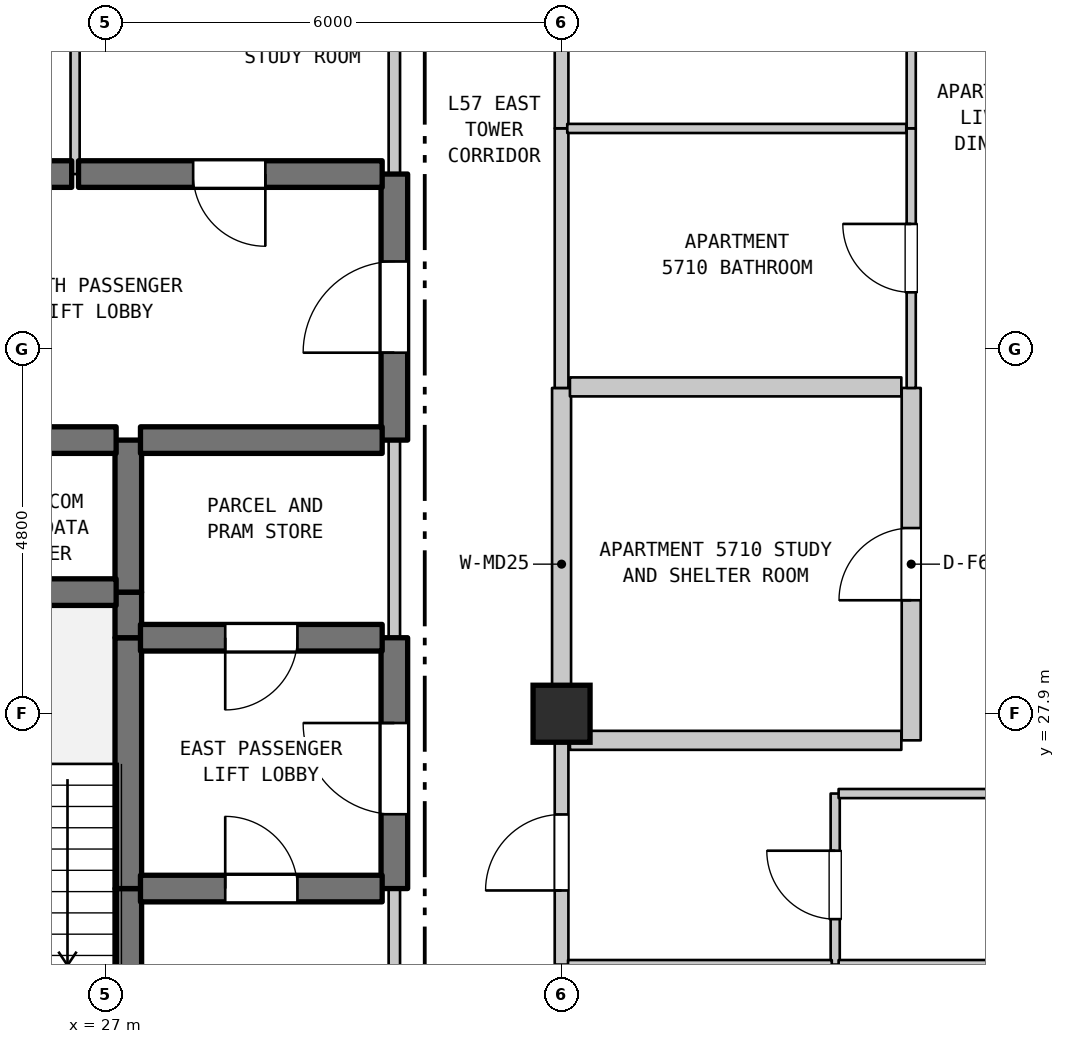
"""IFC4 building model, lengths in metres.
Left out: names, types, materials, properties, quantities, classifications, styles, units other than length and angle.
Written with IfcOpenShell. Run it as: python <this file> out.ifc"""

import sys

from ifc_helpers import new_model, si_unit, direction, frame, frame_2d, origin, origin_2d, place, context, subcontext, project, spatial, rectangle, extrude, element, fill, save


model = new_model("IFC4")
c1 = context("Model", 3, precision=1e-05, world=origin(), true_north=direction((0.0, 1.0)))
c2 = subcontext(c1, "Body", "Model", "MODEL_VIEW")
j1 = project(units=[si_unit("LENGTHUNIT", "METRE"), si_unit("PLANEANGLEUNIT", "RADIAN")], contexts=[c1])
p1 = place(None, origin())
s1 = spatial("IfcSite", under=j1, at=p1, CompositionType="ELEMENT")
p2 = place(p1, origin())
s2 = spatial("IfcBuilding", under=s1, at=p2, CompositionType="ELEMENT")
p3 = place(p2, frame((0.0, 0.0, 230.2)))
s3 = spatial("IfcBuildingStorey", under=s2, at=p3, CompositionType="ELEMENT", Elevation=230.2)
p4 = place(p3, frame((33.0, 27.9, 0.0), z_axis=(0.0, 0.0, 1.0), x_axis=(1.0, 0.0, 0.0)))
e1 = element("IfcColumn", 1, at=p4, inside=s3, PredefinedType="COLUMN", context=c2, shape_type="SweptSolid", body=[
    extrude(rectangle(XDim=0.75, YDim=0.75, at=origin_2d()), origin(), (0.0, 0.0, 1.0), 3.7),
])
p5 = place(p3, frame((26.6, 35.0, 0.0), z_axis=(0.0, 0.0, 1.0), x_axis=(0.0, 1.0, 0.0)))
e2 = element("IfcWall", 2, at=p5, inside=s3, PredefinedType="PARTITIONING", context=c2, shape_type="SweptSolid", body=[
    extrude(rectangle(XDim=2.9, YDim=0.12, at=frame_2d((1.45, 0.0))), origin(), (0.0, 0.0, 1.0), 3.39),
])
p6 = place(p3, frame((27.3, 22.7, 0.0), z_axis=(0.0, 0.0, 1.0), x_axis=(0.0, 1.0, 0.0)))
e3 = element("IfcWall", 3, at=p6, inside=s3, PredefinedType="SHEAR", context=c2, shape_type="SweptSolid", body=[
    extrude(rectangle(XDim=2.9, YDim=0.35, at=frame_2d((1.45, 0.0))), origin(), (0.0, 0.0, 1.0), 3.39),
])
p7 = place(p3, frame((27.3, 25.6, 0.0), z_axis=(0.0, 0.0, 1.0), x_axis=(0.0, 1.0, 0.0)))
e4 = element("IfcWall", 4, at=p7, inside=s3, PredefinedType="SHEAR", context=c2, shape_type="SweptSolid", body=[
    extrude(rectangle(XDim=3.3, YDim=0.35, at=frame_2d((1.65, 0.0))), origin(), (0.0, 0.0, 1.0), 3.39),
])
p8 = place(p3, frame((27.3, 28.9, 0.0), z_axis=(0.0, 0.0, 1.0), x_axis=(0.0, 1.0, 0.0)))
e5 = element("IfcWall", 5, at=p8, inside=s3, PredefinedType="SHEAR", context=c2, shape_type="SweptSolid", body=[
    extrude(rectangle(XDim=0.6, YDim=0.35, at=frame_2d((0.3, 0.0))), origin(), (0.0, 0.0, 1.0), 3.39),
])
p9 = place(p3, frame((27.3, 29.5, 0.0), z_axis=(0.0, 0.0, 1.0), x_axis=(0.0, 1.0, 0.0)))
e6 = element("IfcWall", 6, at=p9, inside=s3, PredefinedType="SHEAR", context=c2, shape_type="SweptSolid", body=[
    extrude(rectangle(XDim=2.0, YDim=0.35, at=frame_2d((1.0, 0.0))), origin(), (0.0, 0.0, 1.0), 3.39),
])
p10 = place(p3, frame((30.8, 22.7, 0.0), z_axis=(0.0, 0.0, 1.0), x_axis=(0.0, 1.0, 0.0)))
e7 = element("IfcWall", 7, at=p10, inside=s3, PredefinedType="STANDARD", context=c2, shape_type="SweptSolid", body=[
    extrude(rectangle(XDim=2.9, YDim=0.15, at=frame_2d((1.45, 0.0))), origin(), (0.0, 0.0, 1.0), 3.39),
])
p11 = place(p3, frame((30.8, 25.6, 0.0), z_axis=(0.0, 0.0, 1.0), x_axis=(0.0, 1.0, 0.0)))
e8 = element("IfcWall", 8, at=p11, inside=s3, PredefinedType="SHEAR", context=c2, shape_type="SweptSolid", body=[
    extrude(rectangle(XDim=3.3, YDim=0.35, at=frame_2d((1.65, 0.0))), origin(), (0.0, 0.0, 1.0), 3.39),
])
p12 = place(p11, frame((0.978, 0.0, 0.0)))
e9 = element("IfcOpeningElement", 9, at=p12, cuts=e8, PredefinedType="OPENING", context=c2, shape_type="SweptSolid", body=[
    extrude(rectangle(XDim=1.2, YDim=2.2, at=frame_2d((0.6, 1.1))), frame((0.0, 0.185, 0.0), z_axis=(0.0, -1.0, 0.0), x_axis=(1.0, 0.0, 0.0)), (0.0, 0.0, 1.0), 0.37),
])
p13 = place(p3, frame((30.8, 28.9, 0.0), z_axis=(0.0, 0.0, 1.0), x_axis=(0.0, 1.0, 0.0)))
e10 = element("IfcWall", 10, at=p13, inside=s3, PredefinedType="STANDARD", context=c2, shape_type="SweptSolid", body=[
    extrude(rectangle(XDim=2.6, YDim=0.15, at=frame_2d((1.3, 0.0))), origin(), (0.0, 0.0, 1.0), 3.39),
])
p14 = place(p3, frame((30.8, 31.5, 0.0), z_axis=(0.0, 0.0, 1.0), x_axis=(0.0, 1.0, 0.0)))
e11 = element("IfcWall", 11, at=p14, inside=s3, PredefinedType="SHEAR", context=c2, shape_type="SweptSolid", body=[
    extrude(rectangle(XDim=3.5, YDim=0.35, at=frame_2d((1.75, 0.0))), origin(), (0.0, 0.0, 1.0), 3.39),
])
p15 = place(p14, frame((1.15, 0.0, 0.0)))
e12 = element("IfcOpeningElement", 12, at=p15, cuts=e11, PredefinedType="OPENING", context=c2, shape_type="SweptSolid", body=[
    extrude(rectangle(XDim=1.2, YDim=2.2, at=frame_2d((0.6, 1.1))), frame((0.0, 0.185, 0.0), z_axis=(0.0, -1.0, 0.0), x_axis=(1.0, 0.0, 0.0)), (0.0, 0.0, 1.0), 0.37),
])
p16 = place(p3, frame((30.8, 35.0, 0.0), z_axis=(0.0, 0.0, 1.0), x_axis=(0.0, 1.0, 0.0)))
e13 = element("IfcWall", 13, at=p16, inside=s3, PredefinedType="STANDARD", context=c2, shape_type="SweptSolid", body=[
    extrude(rectangle(XDim=2.9, YDim=0.15, at=frame_2d((1.45, 0.0))), origin(), (0.0, 0.0, 1.0), 3.39),
])
p17 = place(p3, frame((33.0, 24.6, 0.0), z_axis=(0.0, 0.0, 1.0), x_axis=(0.0, 1.0, 0.0)))
e14 = element("IfcWall", 14, at=p17, inside=s3, PredefinedType="STANDARD", context=c2, shape_type="SweptSolid", body=[
    extrude(rectangle(XDim=2.95, YDim=0.18, at=frame_2d((1.475, 0.0))), origin(), (0.0, 0.0, 1.0), 2.99),
])
p18 = place(p17, frame((0.975, 0.0, 0.0)))
e15 = element("IfcOpeningElement", 15, at=p18, cuts=e14, PredefinedType="OPENING", context=c2, shape_type="SweptSolid", body=[
    extrude(rectangle(XDim=1.0, YDim=2.15, at=frame_2d((0.5, 1.075))), frame((0.0, 0.1, 0.0), z_axis=(0.0, -1.0, 0.0), x_axis=(1.0, 0.0, 0.0)), (0.0, 0.0, 1.0), 0.2),
])
p19 = place(p3, frame((33.0, 27.55, 0.0), z_axis=(0.0, 0.0, 1.0), x_axis=(0.0, 1.0, 0.0)))
e16 = element("IfcWall", 16, at=p19, inside=s3, PredefinedType="STANDARD", context=c2, shape_type="SweptSolid", body=[
    extrude(rectangle(XDim=4.636, YDim=0.25, at=frame_2d((2.318, 0.0))), origin(), (0.0, 0.0, 1.0), 2.89),
])
p20 = place(p3, frame((33.0, 32.186, 0.0), z_axis=(0.0, 0.0, 1.0), x_axis=(0.0, 1.0, 0.0)))
e17 = element("IfcWall", 17, at=p20, inside=s3, PredefinedType="STANDARD", context=c2, shape_type="SweptSolid", body=[
    extrude(rectangle(XDim=3.416, YDim=0.18, at=frame_2d((1.708, 0.0))), origin(), (0.0, 0.0, 1.0), 2.89),
])
p21 = place(p3, frame((33.0, 35.602, 0.0), z_axis=(0.0, 0.0, 1.0), x_axis=(0.0, 1.0, 0.0)))
e18 = element("IfcWall", 18, at=p21, inside=s3, PredefinedType="STANDARD", context=c2, shape_type="SweptSolid", body=[
    extrude(rectangle(XDim=2.298, YDim=0.18, at=frame_2d((1.149, 0.0))), origin(), (0.0, 0.0, 1.0), 2.89),
])
p22 = place(p3, frame((36.6, 24.6, 0.0), z_axis=(0.0, 0.0, 1.0), x_axis=(0.0, 1.0, 0.0)))
e19 = element("IfcWall", 19, at=p22, inside=s3, PredefinedType="PARTITIONING", context=c2, shape_type="SweptSolid", body=[
    extrude(rectangle(XDim=2.25, YDim=0.12, at=frame_2d((1.125, 0.0))), origin(), (0.0, 0.0, 1.0), 3.39),
])
p23 = place(p22, frame((0.598, 0.0, 0.0)))
e20 = element("IfcOpeningElement", 20, at=p23, cuts=e19, PredefinedType="OPENING", context=c2, shape_type="SweptSolid", body=[
    extrude(rectangle(XDim=0.9, YDim=2.15, at=frame_2d((0.45, 1.075))), frame((0.0, 0.07, 0.0), z_axis=(0.0, -1.0, 0.0), x_axis=(1.0, 0.0, 0.0)), (0.0, 0.0, 1.0), 0.14),
])
p24 = place(p3, frame((37.6, 27.55, 0.0), z_axis=(0.0, 0.0, 1.0), x_axis=(0.0, 1.0, 0.0)))
e21 = element("IfcWall", 21, at=p24, inside=s3, PredefinedType="STANDARD", context=c2, shape_type="SweptSolid", body=[
    extrude(rectangle(XDim=4.636, YDim=0.25, at=frame_2d((2.318, 0.0))), origin(), (0.0, 0.0, 1.0), 3.39),
])
p25 = place(p24, frame((1.843, 0.0, 0.0)))
e22 = element("IfcOpeningElement", 22, at=p25, cuts=e21, PredefinedType="OPENING", context=c2, shape_type="SweptSolid", body=[
    extrude(rectangle(XDim=0.95, YDim=2.15, at=frame_2d((0.475, 1.075))), frame((0.0, 0.135, 0.0), z_axis=(0.0, -1.0, 0.0), x_axis=(1.0, 0.0, 0.0)), (0.0, 0.0, 1.0), 0.27),
])
p26 = place(p3, frame((37.6, 32.186, 0.0), z_axis=(0.0, 0.0, 1.0), x_axis=(0.0, 1.0, 0.0)))
e23 = element("IfcWall", 23, at=p26, inside=s3, PredefinedType="PARTITIONING", context=c2, shape_type="SweptSolid", body=[
    extrude(rectangle(XDim=3.416, YDim=0.12, at=frame_2d((1.708, 0.0))), origin(), (0.0, 0.0, 1.0), 3.39),
])
p27 = place(p26, frame((1.258, 0.0, 0.0)))
e24 = element("IfcOpeningElement", 24, at=p27, cuts=e23, PredefinedType="OPENING", context=c2, shape_type="SweptSolid", body=[
    extrude(rectangle(XDim=0.9, YDim=2.1, at=frame_2d((0.45, 1.05))), frame((0.0, 0.07, 0.0), z_axis=(0.0, -1.0, 0.0), x_axis=(1.0, 0.0, 0.0)), (0.0, 0.0, 1.0), 0.14),
])
p28 = place(p3, frame((37.6, 35.602, 0.0), z_axis=(0.0, 0.0, 1.0), x_axis=(0.0, 1.0, 0.0)))
e25 = element("IfcWall", 25, at=p28, inside=s3, PredefinedType="PARTITIONING", context=c2, shape_type="SweptSolid", body=[
    extrude(rectangle(XDim=4.148, YDim=0.12, at=frame_2d((2.074, 0.0))), origin(), (0.0, 0.0, 1.0), 3.39),
])
p29 = place(p28, frame((1.552, 0.0, 0.0)))
e26 = element("IfcOpeningElement", 26, at=p29, cuts=e25, PredefinedType="OPENING", context=c2, shape_type="SweptSolid", body=[
    extrude(rectangle(XDim=0.9, YDim=2.15, at=frame_2d((0.45, 1.075))), frame((0.0, 0.07, 0.0), z_axis=(0.0, -1.0, 0.0), x_axis=(1.0, 0.0, 0.0)), (0.0, 0.0, 1.0), 0.14),
])
p30 = place(p3, frame((33.085, 24.6, 0.0), z_axis=(0.0, 0.0, 1.0), x_axis=(1.0, 0.0, 0.0)))
e27 = element("IfcWall", 27, at=p30, inside=s3, PredefinedType="PARTITIONING", context=c2, shape_type="SweptSolid", body=[
    extrude(rectangle(XDim=3.47, YDim=0.12, at=frame_2d((1.735, 0.0))), origin(), (0.0, 0.0, 1.0), 3.39),
])
p31 = place(p3, frame((36.645, 24.6, 0.0), z_axis=(0.0, 0.0, 1.0), x_axis=(1.0, 0.0, 0.0)))
e28 = element("IfcWall", 28, at=p31, inside=s3, PredefinedType="PARTITIONING", context=c2, shape_type="SweptSolid", body=[
    extrude(rectangle(XDim=20.345, YDim=0.12, at=frame_2d((10.172, 0.0))), origin(), (0.0, 0.0, 1.0), 3.39),
])
p32 = place(p3, frame((27.46, 25.6, 0.0), z_axis=(0.0, 0.0, 1.0), x_axis=(1.0, 0.0, 0.0)))
e29 = element("IfcWall", 29, at=p32, inside=s3, PredefinedType="SHEAR", context=c2, shape_type="SweptSolid", body=[
    extrude(rectangle(XDim=3.18, YDim=0.35, at=frame_2d((1.59, 0.0))), origin(), (0.0, 0.0, 1.0), 3.39),
])
p33 = place(p32, frame((1.115, 0.0, 0.0)))
e30 = element("IfcOpeningElement", 30, at=p33, cuts=e29, PredefinedType="OPENING", context=c2, shape_type="SweptSolid", body=[
    extrude(rectangle(XDim=0.95, YDim=2.15, at=frame_2d((0.475, 1.075))), frame((0.0, 0.185, 0.0), z_axis=(0.0, -1.0, 0.0), x_axis=(1.0, 0.0, 0.0)), (0.0, 0.0, 1.0), 0.37),
])
p34 = place(p3, frame((36.645, 26.85, 0.0), z_axis=(0.0, 0.0, 1.0), x_axis=(1.0, 0.0, 0.0)))
e31 = element("IfcWall", 31, at=p34, inside=s3, PredefinedType="PARTITIONING", context=c2, shape_type="SweptSolid", body=[
    extrude(rectangle(XDim=19.951, YDim=0.12, at=frame_2d((9.976, 0.0))), origin(), (0.0, 0.0, 1.0), 3.39),
])
p35 = place(p3, frame((33.11, 27.55, 0.0), z_axis=(0.0, 0.0, 1.0), x_axis=(1.0, 0.0, 0.0)))
e32 = element("IfcWall", 32, at=p35, inside=s3, PredefinedType="STANDARD", context=c2, shape_type="SweptSolid", body=[
    extrude(rectangle(XDim=4.36, YDim=0.25, at=frame_2d((2.18, 0.0))), origin(), (0.0, 0.0, 1.0), 3.39),
])
p36 = place(p3, frame((27.46, 28.9, 0.0), z_axis=(0.0, 0.0, 1.0), x_axis=(1.0, 0.0, 0.0)))
e33 = element("IfcWall", 33, at=p36, inside=s3, PredefinedType="SHEAR", context=c2, shape_type="SweptSolid", body=[
    extrude(rectangle(XDim=3.18, YDim=0.35, at=frame_2d((1.59, 0.0))), origin(), (0.0, 0.0, 1.0), 3.39),
])
p37 = place(p36, frame((1.115, 0.0, 0.0)))
e34 = element("IfcOpeningElement", 34, at=p37, cuts=e33, PredefinedType="OPENING", context=c2, shape_type="SweptSolid", body=[
    extrude(rectangle(XDim=0.95, YDim=2.15, at=frame_2d((0.475, 1.075))), frame((0.0, 0.185, 0.0), z_axis=(0.0, -1.0, 0.0), x_axis=(1.0, 0.0, 0.0)), (0.0, 0.0, 1.0), 0.37),
])
p38 = place(p3, frame((23.96, 29.5, 0.0), z_axis=(0.0, 0.0, 1.0), x_axis=(1.0, 0.0, 0.0)))
e35 = element("IfcWall", 35, at=p38, inside=s3, PredefinedType="SHEAR", context=c2, shape_type="SweptSolid", body=[
    extrude(rectangle(XDim=3.18, YDim=0.35, at=frame_2d((1.59, 0.0))), origin(), (0.0, 0.0, 1.0), 3.39),
])
p39 = place(p3, frame((23.96, 31.5, 0.0), z_axis=(0.0, 0.0, 1.0), x_axis=(1.0, 0.0, 0.0)))
e36 = element("IfcWall", 36, at=p39, inside=s3, PredefinedType="SHEAR", context=c2, shape_type="SweptSolid", body=[
    extrude(rectangle(XDim=3.18, YDim=0.35, at=frame_2d((1.59, 0.0))), origin(), (0.0, 0.0, 1.0), 3.39),
])
p40 = place(p39, frame((1.094, 0.0, 0.0)))
e37 = element("IfcOpeningElement", 37, at=p40, cuts=e36, PredefinedType="OPENING", context=c2, shape_type="SweptSolid", body=[
    extrude(rectangle(XDim=0.85, YDim=2.1, at=frame_2d((0.425, 1.05))), frame((0.0, 0.185, 0.0), z_axis=(0.0, -1.0, 0.0), x_axis=(1.0, 0.0, 0.0)), (0.0, 0.0, 1.0), 0.37),
])
p41 = place(p3, frame((27.46, 31.5, 0.0), z_axis=(0.0, 0.0, 1.0), x_axis=(1.0, 0.0, 0.0)))
e38 = element("IfcWall", 38, at=p41, inside=s3, PredefinedType="SHEAR", context=c2, shape_type="SweptSolid", body=[
    extrude(rectangle(XDim=3.18, YDim=0.35, at=frame_2d((1.59, 0.0))), origin(), (0.0, 0.0, 1.0), 3.39),
])
p42 = place(p3, frame((33.11, 32.2, 0.0), z_axis=(0.0, 0.0, 1.0), x_axis=(1.0, 0.0, 0.0)))
e39 = element("IfcWall", 39, at=p42, inside=s3, PredefinedType="STANDARD", context=c2, shape_type="SweptSolid", body=[
    extrude(rectangle(XDim=4.36, YDim=0.25, at=frame_2d((2.18, 0.0))), origin(), (0.0, 0.0, 1.0), 3.39),
])
p43 = place(p3, frame((23.96, 35.0, 0.0), z_axis=(0.0, 0.0, 1.0), x_axis=(1.0, 0.0, 0.0)))
e40 = element("IfcWall", 40, at=p43, inside=s3, PredefinedType="SHEAR", context=c2, shape_type="SweptSolid", body=[
    extrude(rectangle(XDim=2.595, YDim=0.35, at=frame_2d((1.297, 0.0))), origin(), (0.0, 0.0, 1.0), 3.39),
])
p44 = place(p43, frame((0.691, 0.0, 0.0)))
e41 = element("IfcOpeningElement", 41, at=p44, cuts=e40, PredefinedType="OPENING", context=c2, shape_type="SweptSolid", body=[
    extrude(rectangle(XDim=0.95, YDim=2.15, at=frame_2d((0.475, 1.075))), frame((0.0, 0.185, 0.0), z_axis=(0.0, -1.0, 0.0), x_axis=(1.0, 0.0, 0.0)), (0.0, 0.0, 1.0), 0.37),
])
p45 = place(p3, frame((26.645, 35.0, 0.0), z_axis=(0.0, 0.0, 1.0), x_axis=(1.0, 0.0, 0.0)))
e42 = element("IfcWall", 42, at=p45, inside=s3, PredefinedType="SHEAR", context=c2, shape_type="SweptSolid", body=[
    extrude(rectangle(XDim=3.995, YDim=0.35, at=frame_2d((1.998, 0.0))), origin(), (0.0, 0.0, 1.0), 3.39),
])
p46 = place(p45, frame((1.508, 0.0, 0.0)))
e43 = element("IfcOpeningElement", 43, at=p46, cuts=e42, PredefinedType="OPENING", context=c2, shape_type="SweptSolid", body=[
    extrude(rectangle(XDim=0.95, YDim=2.15, at=frame_2d((0.475, 1.075))), frame((0.0, 0.185, 0.0), z_axis=(0.0, -1.0, 0.0), x_axis=(1.0, 0.0, 0.0)), (0.0, 0.0, 1.0), 0.37),
])
p47 = place(p3, frame((33.075, 35.6, 0.0), z_axis=(0.0, 0.0, 1.0), x_axis=(1.0, 0.0, 0.0)))
e44 = element("IfcWall", 44, at=p47, inside=s3, PredefinedType="PARTITIONING", context=c2, shape_type="SweptSolid", body=[
    extrude(rectangle(XDim=4.46, YDim=0.12, at=frame_2d((2.23, 0.0))), origin(), (0.0, 0.0, 1.0), 3.39),
])
p48 = place(p12, origin())
e45 = element("IfcDoor", 45, at=p48, inside=s3, OperationType="SINGLE_SWING_RIGHT", PredefinedType="DOOR", context=c2, shape_type="SweptSolid", body=[
    extrude(rectangle(XDim=1.2, YDim=2.2, at=frame_2d((0.6, 1.1))), frame((0.0, 0.025, 0.0), z_axis=(0.0, -1.0, 0.0), x_axis=(1.0, 0.0, 0.0)), (0.0, 0.0, 1.0), 0.05),
])
fill(e9, e45)
p49 = place(p15, origin())
e46 = element("IfcDoor", 46, at=p49, inside=s3, OperationType="SINGLE_SWING_LEFT", PredefinedType="DOOR", context=c2, shape_type="SweptSolid", body=[
    extrude(rectangle(XDim=1.2, YDim=2.2, at=frame_2d((0.6, 1.1))), frame((0.0, 0.025, 0.0), z_axis=(0.0, -1.0, 0.0), x_axis=(1.0, 0.0, 0.0)), (0.0, 0.0, 1.0), 0.05),
])
fill(e12, e46)
p50 = place(p18, origin())
e47 = element("IfcDoor", 47, at=p50, inside=s3, OperationType="SINGLE_SWING_LEFT", PredefinedType="DOOR", context=c2, shape_type="SweptSolid", body=[
    extrude(rectangle(XDim=1.0, YDim=2.15, at=frame_2d((0.5, 1.075))), frame((0.0, 0.025, 0.0), z_axis=(0.0, -1.0, 0.0), x_axis=(1.0, 0.0, 0.0)), (0.0, 0.0, 1.0), 0.05),
])
fill(e15, e47)
p51 = place(p23, origin())
e48 = element("IfcDoor", 48, at=p51, inside=s3, OperationType="SINGLE_SWING_RIGHT", PredefinedType="DOOR", context=c2, shape_type="SweptSolid", body=[
    extrude(rectangle(XDim=0.9, YDim=2.15, at=frame_2d((0.45, 1.075))), frame((0.0, 0.025, 0.0), z_axis=(0.0, -1.0, 0.0), x_axis=(1.0, 0.0, 0.0)), (0.0, 0.0, 1.0), 0.05),
])
fill(e20, e48)
p52 = place(p25, origin())
e49 = element("IfcDoor", 49, at=p52, inside=s3, OperationType="SINGLE_SWING_LEFT", PredefinedType="DOOR", context=c2, shape_type="SweptSolid", body=[
    extrude(rectangle(XDim=0.95, YDim=2.15, at=frame_2d((0.475, 1.075))), frame((0.0, 0.025, 0.0), z_axis=(0.0, -1.0, 0.0), x_axis=(1.0, 0.0, 0.0)), (0.0, 0.0, 1.0), 0.05),
])
fill(e22, e49)
p53 = place(p27, origin())
e50 = element("IfcDoor", 50, at=p53, inside=s3, OperationType="SINGLE_SWING_RIGHT", PredefinedType="DOOR", context=c2, shape_type="SweptSolid", body=[
    extrude(rectangle(XDim=0.9, YDim=2.1, at=frame_2d((0.45, 1.05))), frame((0.0, 0.025, 0.0), z_axis=(0.0, -1.0, 0.0), x_axis=(1.0, 0.0, 0.0)), (0.0, 0.0, 1.0), 0.05),
])
fill(e24, e50)
p54 = place(p33, origin())
e51 = element("IfcDoor", 51, at=p54, inside=s3, OperationType="SINGLE_SWING_LEFT", PredefinedType="DOOR", context=c2, shape_type="SweptSolid", body=[
    extrude(rectangle(XDim=0.95, YDim=2.15, at=frame_2d((0.475, 1.075))), frame((0.0, 0.025, 0.0), z_axis=(0.0, -1.0, 0.0), x_axis=(1.0, 0.0, 0.0)), (0.0, 0.0, 1.0), 0.05),
])
fill(e30, e51)
p55 = place(p37, frame((0.95, 0.0, 0.0), z_axis=(0.0, 0.0, 1.0), x_axis=(-1.0, 0.0, 0.0)))
e52 = element("IfcDoor", 52, at=p55, inside=s3, OperationType="SINGLE_SWING_LEFT", PredefinedType="DOOR", context=c2, shape_type="SweptSolid", body=[
    extrude(rectangle(XDim=0.95, YDim=2.15, at=frame_2d((0.475, 1.075))), frame((0.0, 0.025, 0.0), z_axis=(0.0, -1.0, 0.0), x_axis=(1.0, 0.0, 0.0)), (0.0, 0.0, 1.0), 0.05),
])
fill(e34, e52)
p56 = place(p46, frame((0.95, 0.0, 0.0), z_axis=(0.0, 0.0, 1.0), x_axis=(-1.0, 0.0, 0.0)))
e53 = element("IfcDoor", 53, at=p56, inside=s3, OperationType="SINGLE_SWING_RIGHT", PredefinedType="DOOR", context=c2, shape_type="SweptSolid", body=[
    extrude(rectangle(XDim=0.95, YDim=2.15, at=frame_2d((0.475, 1.075))), frame((0.0, 0.025, 0.0), z_axis=(0.0, -1.0, 0.0), x_axis=(1.0, 0.0, 0.0)), (0.0, 0.0, 1.0), 0.05),
])
fill(e43, e53)
save(model, sys.argv[1])
